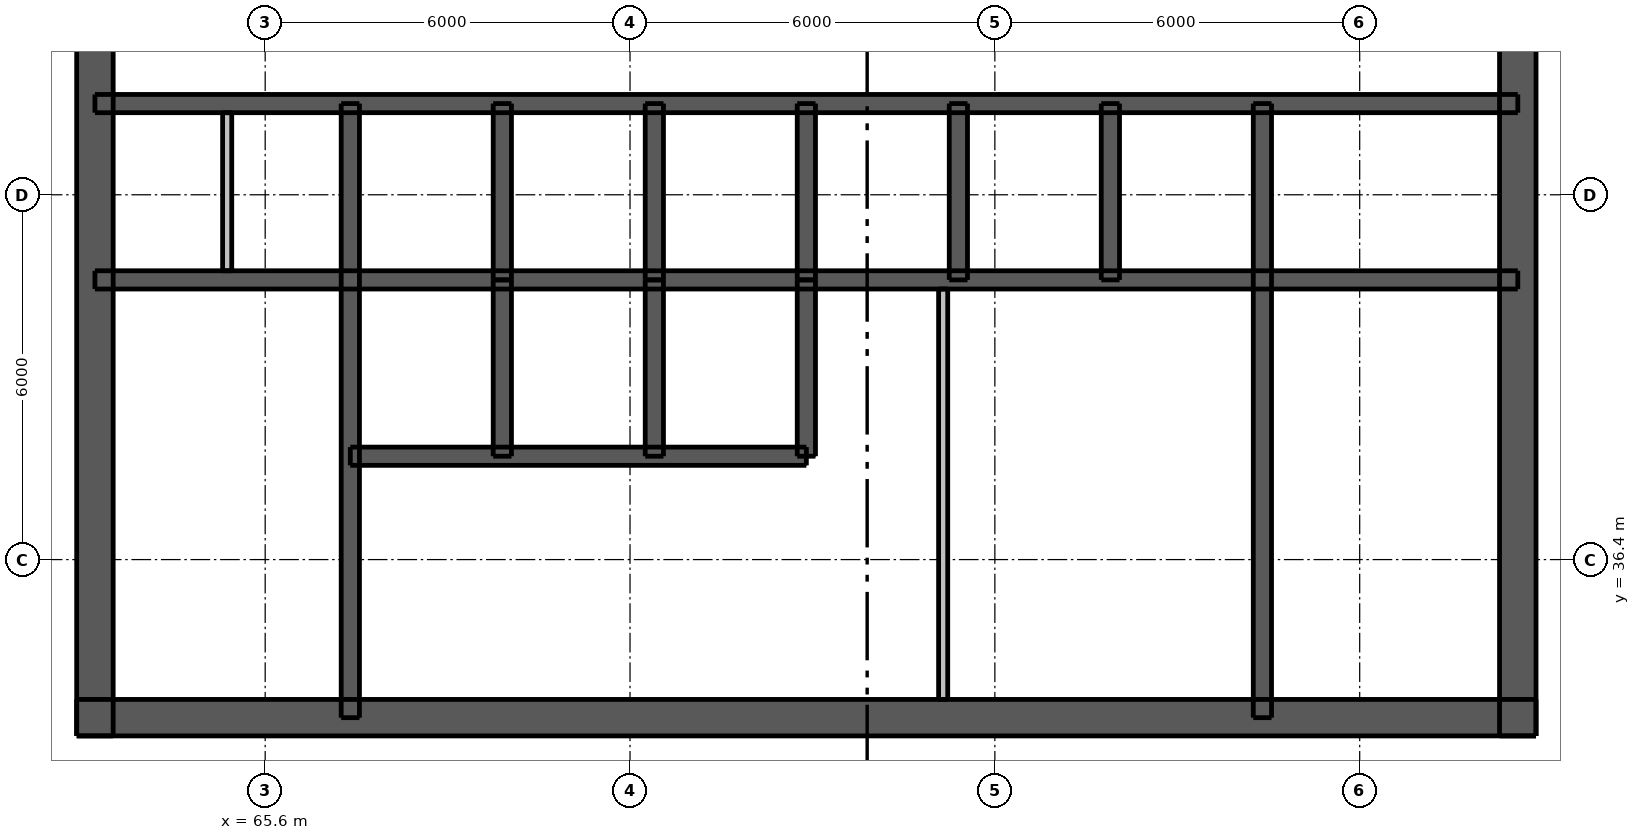
"""IFC4 building model, lengths in metres.
Left out: names, types, materials, properties, quantities, classifications, styles, units other than length and angle.
Written with IfcOpenShell. Run it as: python <this file> out.ifc"""

import sys

from ifc_helpers import new_model, si_unit, direction, frame, frame_2d, origin, place, context, subcontext, project, spatial, rectangle, extrude, element, fill, save


model = new_model("IFC4")
c1 = context("Model", 3, precision=1e-05, world=origin(), true_north=direction((0.0, 1.0)))
c2 = subcontext(c1, "Body", "Model", "MODEL_VIEW")
j1 = project(units=[si_unit("LENGTHUNIT", "METRE"), si_unit("PLANEANGLEUNIT", "RADIAN")], contexts=[c1])
p1 = place(None, origin())
s1 = spatial("IfcSite", under=j1, at=p1, CompositionType="ELEMENT")
p2 = place(p1, origin())
s2 = spatial("IfcBuilding", under=s1, at=p2, CompositionType="ELEMENT")
p3 = place(p2, frame((0.0, 0.0, 210.1)))
s3 = spatial("IfcBuildingStorey", under=s2, at=p3, CompositionType="ELEMENT", Elevation=210.1)
p4 = place(p3, frame((62.5, 33.8, 0.0), z_axis=(0.0, 0.0, 1.0), x_axis=(1.0, 0.0, 0.0)))
e1 = element("IfcWall", 1, at=p4, inside=s3, PredefinedType="SHEAR", context=c2, shape_type="SweptSolid", body=[
    extrude(rectangle(XDim=24.0, YDim=0.6, at=frame_2d((12.0, 0.0))), origin(), (0.0, 0.0, 1.0), 3.05),
])
p5 = place(p4, frame((1.925, 0.0, 0.0)))
e2 = element("IfcOpeningElement", 2, at=p5, cuts=e1, PredefinedType="OPENING", context=c2, shape_type="SweptSolid", body=[
    extrude(rectangle(XDim=1.1, YDim=2.1, at=frame_2d((0.55, 1.05))), frame((0.0, 0.31, 0.0), z_axis=(0.0, -1.0, 0.0), x_axis=(1.0, 0.0, 0.0)), (0.0, 0.0, 1.0), 0.62),
])
p6 = place(p4, frame((20.975, 0.0, 0.0)))
e3 = element("IfcOpeningElement", 3, at=p6, cuts=e1, PredefinedType="OPENING", context=c2, shape_type="SweptSolid", body=[
    extrude(rectangle(XDim=1.1, YDim=2.1, at=frame_2d((0.55, 1.05))), frame((0.0, 0.31, 0.0), z_axis=(0.0, -1.0, 0.0), x_axis=(1.0, 0.0, 0.0)), (0.0, 0.0, 1.0), 0.62),
])
p7 = place(p4, frame((8.0, 0.0, 0.0)))
e4 = element("IfcOpeningElement", 4, at=p7, cuts=e1, PredefinedType="OPENING", context=c2, shape_type="SweptSolid", body=[
    extrude(rectangle(XDim=1.1, YDim=2.1, at=frame_2d((0.55, 1.05))), frame((0.0, 0.31, 0.0), z_axis=(0.0, -1.0, 0.0), x_axis=(1.0, 0.0, 0.0)), (0.0, 0.0, 1.0), 0.62),
])
p8 = place(p4, frame((16.387, 0.0, 0.0)))
e5 = element("IfcOpeningElement", 5, at=p8, cuts=e1, PredefinedType="OPENING", context=c2, shape_type="SweptSolid", body=[
    extrude(rectangle(XDim=0.9, YDim=2.1, at=frame_2d((0.45, 1.05))), frame((0.0, 0.31, 0.0), z_axis=(0.0, -1.0, 0.0), x_axis=(1.0, 0.0, 0.0)), (0.0, 0.0, 1.0), 0.62),
])
p9 = place(p3, frame((62.8, 33.5, 0.0), z_axis=(0.0, 0.0, 1.0), x_axis=(0.0, 1.0, 0.0)))
e6 = element("IfcWall", 6, at=p9, inside=s3, PredefinedType="SHEAR", context=c2, shape_type="SweptSolid", body=[
    extrude(rectangle(XDim=24.0, YDim=0.6, at=frame_2d((12.0, 0.0))), origin(), (0.0, 0.0, 1.0), 3.05),
])
p10 = place(p9, frame((11.2, 0.0, 0.0)))
e7 = element("IfcOpeningElement", 7, at=p10, cuts=e6, PredefinedType="OPENING", context=c2, shape_type="SweptSolid", body=[
    extrude(rectangle(XDim=1.6, YDim=2.1, at=frame_2d((0.8, 1.05))), frame((0.0, 0.31, 0.0), z_axis=(0.0, -1.0, 0.0), x_axis=(1.0, 0.0, 0.0)), (0.0, 0.0, 1.0), 0.62),
])
p11 = place(p3, frame((86.2, 33.5, 0.0), z_axis=(0.0, 0.0, 1.0), x_axis=(0.0, 1.0, 0.0)))
e8 = element("IfcWall", 8, at=p11, inside=s3, PredefinedType="SHEAR", context=c2, shape_type="SweptSolid", body=[
    extrude(rectangle(XDim=24.0, YDim=0.6, at=frame_2d((12.0, 0.0))), origin(), (0.0, 0.0, 1.0), 3.05),
])
p12 = place(p11, frame((11.2, 0.0, 0.0)))
e9 = element("IfcOpeningElement", 9, at=p12, cuts=e8, PredefinedType="OPENING", context=c2, shape_type="SweptSolid", body=[
    extrude(rectangle(XDim=1.6, YDim=2.1, at=frame_2d((0.8, 1.05))), frame((0.0, 0.31, 0.0), z_axis=(0.0, -1.0, 0.0), x_axis=(1.0, 0.0, 0.0)), (0.0, 0.0, 1.0), 0.62),
])
p13 = place(p3, frame((62.8, 41.0, 0.0), z_axis=(0.0, 0.0, 1.0), x_axis=(1.0, 0.0, 0.0)))
e10 = element("IfcWall", 10, at=p13, inside=s3, PredefinedType="SHEAR", context=c2, shape_type="SweptSolid", body=[
    extrude(rectangle(XDim=23.4, YDim=0.3, at=frame_2d((11.7, 0.0))), origin(), (0.0, 0.0, 1.0), 3.05),
])
p14 = place(p3, frame((62.8, 43.9, 0.0), z_axis=(0.0, 0.0, 1.0), x_axis=(1.0, 0.0, 0.0)))
e11 = element("IfcWall", 11, at=p14, inside=s3, PredefinedType="SHEAR", context=c2, shape_type="SweptSolid", body=[
    extrude(rectangle(XDim=23.4, YDim=0.3, at=frame_2d((11.7, 0.0))), origin(), (0.0, 0.0, 1.0), 3.05),
])
p15 = place(p14, frame((0.788, 0.0, 0.0)))
e12 = element("IfcOpeningElement", 12, at=p15, cuts=e11, PredefinedType="OPENING", context=c2, shape_type="SweptSolid", body=[
    extrude(rectangle(XDim=0.9, YDim=2.1, at=frame_2d((0.45, 1.05))), frame((0.0, 0.16, 0.0), z_axis=(0.0, -1.0, 0.0), x_axis=(1.0, 0.0, 0.0)), (0.0, 0.0, 1.0), 0.32),
])
p16 = place(p14, frame((2.663, 0.0, 0.0)))
e13 = element("IfcOpeningElement", 13, at=p16, cuts=e11, PredefinedType="OPENING", context=c2, shape_type="SweptSolid", body=[
    extrude(rectangle(XDim=0.9, YDim=2.1, at=frame_2d((0.45, 1.05))), frame((0.0, 0.16, 0.0), z_axis=(0.0, -1.0, 0.0), x_axis=(1.0, 0.0, 0.0)), (0.0, 0.0, 1.0), 0.32),
])
p17 = place(p14, frame((20.775, 0.0, 0.0)))
e14 = element("IfcOpeningElement", 14, at=p17, cuts=e11, PredefinedType="OPENING", context=c2, shape_type="SweptSolid", body=[
    extrude(rectangle(XDim=0.9, YDim=2.1, at=frame_2d((0.45, 1.05))), frame((0.0, 0.16, 0.0), z_axis=(0.0, -1.0, 0.0), x_axis=(1.0, 0.0, 0.0)), (0.0, 0.0, 1.0), 0.32),
])
p18 = place(p14, frame((5.0, 0.0, 0.0)))
e15 = element("IfcOpeningElement", 15, at=p18, cuts=e11, PredefinedType="OPENING", context=c2, shape_type="SweptSolid", body=[
    extrude(rectangle(XDim=0.9, YDim=2.1, at=frame_2d((0.45, 1.05))), frame((0.0, 0.16, 0.0), z_axis=(0.0, -1.0, 0.0), x_axis=(1.0, 0.0, 0.0)), (0.0, 0.0, 1.0), 0.32),
])
p19 = place(p14, frame((10.0, 0.0, 0.0)))
e16 = element("IfcOpeningElement", 16, at=p19, cuts=e11, PredefinedType="OPENING", context=c2, shape_type="SweptSolid", body=[
    extrude(rectangle(XDim=0.9, YDim=2.1, at=frame_2d((0.45, 1.05))), frame((0.0, 0.16, 0.0), z_axis=(0.0, -1.0, 0.0), x_axis=(1.0, 0.0, 0.0)), (0.0, 0.0, 1.0), 0.32),
])
p20 = place(p14, frame((12.5, 0.0, 0.0)))
e17 = element("IfcOpeningElement", 17, at=p20, cuts=e11, PredefinedType="OPENING", context=c2, shape_type="SweptSolid", body=[
    extrude(rectangle(XDim=0.9, YDim=2.1, at=frame_2d((0.45, 1.05))), frame((0.0, 0.16, 0.0), z_axis=(0.0, -1.0, 0.0), x_axis=(1.0, 0.0, 0.0)), (0.0, 0.0, 1.0), 0.32),
])
p21 = place(p14, frame((17.5, 0.0, 0.0)))
e18 = element("IfcOpeningElement", 18, at=p21, cuts=e11, PredefinedType="OPENING", context=c2, shape_type="SweptSolid", body=[
    extrude(rectangle(XDim=0.9, YDim=2.1, at=frame_2d((0.45, 1.05))), frame((0.0, 0.16, 0.0), z_axis=(0.0, -1.0, 0.0), x_axis=(1.0, 0.0, 0.0)), (0.0, 0.0, 1.0), 0.32),
])
p22 = place(p3, frame((67.0, 33.8, 0.0), z_axis=(0.0, 0.0, 1.0), x_axis=(0.0, 1.0, 0.0)))
e19 = element("IfcWall", 19, at=p22, inside=s3, PredefinedType="SHEAR", context=c2, shape_type="SweptSolid", body=[
    extrude(rectangle(XDim=10.1, YDim=0.3, at=frame_2d((5.05, 0.0))), origin(), (0.0, 0.0, 1.0), 3.05),
])
p23 = place(p22, frame((0.5, 0.0, 0.0)))
e20 = element("IfcOpeningElement", 20, at=p23, cuts=e19, PredefinedType="OPENING", context=c2, shape_type="SweptSolid", body=[
    extrude(rectangle(XDim=1.1, YDim=2.1, at=frame_2d((0.55, 1.05))), frame((0.0, 0.16, 0.0), z_axis=(0.0, -1.0, 0.0), x_axis=(1.0, 0.0, 0.0)), (0.0, 0.0, 1.0), 0.32),
])
p24 = place(p3, frame((82.0, 33.8, 0.0), z_axis=(0.0, 0.0, 1.0), x_axis=(0.0, 1.0, 0.0)))
e21 = element("IfcWall", 21, at=p24, inside=s3, PredefinedType="SHEAR", context=c2, shape_type="SweptSolid", body=[
    extrude(rectangle(XDim=10.1, YDim=0.3, at=frame_2d((5.05, 0.0))), origin(), (0.0, 0.0, 1.0), 3.05),
])
for number, where, z_axis, x_axis in (
    (22, (69.5, 41.0, 0.0), (0.0, 0.0, 1.0), (0.0, 1.0, 0.0)),
    (23, (72.0, 41.0, 0.0), (0.0, 0.0, 1.0), (0.0, 1.0, 0.0)),
    (24, (74.5, 41.0, 0.0), (0.0, 0.0, 1.0), (0.0, 1.0, 0.0)),
    (25, (77.0, 41.0, 0.0), (0.0, 0.0, 1.0), (0.0, 1.0, 0.0)),
    (26, (79.5, 41.0, 0.0), (0.0, 0.0, 1.0), (0.0, 1.0, 0.0)),
):
    element("IfcWall", number, at=place(p3, frame(where, z_axis=z_axis, x_axis=x_axis)), inside=s3, PredefinedType="SHEAR", context=c2, shape_type="SweptSolid", body=[
        extrude(rectangle(XDim=2.9, YDim=0.3, at=frame_2d((1.45, 0.0))), origin(), (0.0, 0.0, 1.0), 3.05),
    ])
p25 = place(p3, frame((67.0, 38.1, 0.0), z_axis=(0.0, 0.0, 1.0), x_axis=(1.0, 0.0, 0.0)))
e27 = element("IfcWall", 27, at=p25, inside=s3, PredefinedType="SHEAR", context=c2, shape_type="SweptSolid", body=[
    extrude(rectangle(XDim=7.5, YDim=0.3, at=frame_2d((3.75, 0.0))), origin(), (0.0, 0.0, 1.0), 3.05),
])
p26 = place(p25, frame((0.7, 0.0, 0.0)))
e28 = element("IfcOpeningElement", 28, at=p26, cuts=e27, PredefinedType="OPENING", context=c2, shape_type="SweptSolid", body=[
    extrude(rectangle(XDim=1.1, YDim=2.1, at=frame_2d((0.55, 1.05))), frame((0.0, 0.16, 0.0), z_axis=(0.0, -1.0, 0.0), x_axis=(1.0, 0.0, 0.0)), (0.0, 0.0, 1.0), 0.32),
])
p27 = place(p25, frame((3.2, 0.0, 0.0)))
e29 = element("IfcOpeningElement", 29, at=p27, cuts=e27, PredefinedType="OPENING", context=c2, shape_type="SweptSolid", body=[
    extrude(rectangle(XDim=1.1, YDim=2.1, at=frame_2d((0.55, 1.05))), frame((0.0, 0.16, 0.0), z_axis=(0.0, -1.0, 0.0), x_axis=(1.0, 0.0, 0.0)), (0.0, 0.0, 1.0), 0.32),
])
p28 = place(p25, frame((5.65, 0.0, 0.0)))
e30 = element("IfcOpeningElement", 30, at=p28, cuts=e27, PredefinedType="OPENING", context=c2, shape_type="SweptSolid", body=[
    extrude(rectangle(XDim=1.2, YDim=2.1, at=frame_2d((0.6, 1.05))), frame((0.0, 0.16, 0.0), z_axis=(0.0, -1.0, 0.0), x_axis=(1.0, 0.0, 0.0)), (0.0, 0.0, 1.0), 0.32),
])
for number, where, z_axis, x_axis in (
    (31, (69.5, 38.1, 0.0), (0.0, 0.0, 1.0), (0.0, 1.0, 0.0)),
    (32, (72.0, 38.1, 0.0), (0.0, 0.0, 1.0), (0.0, 1.0, 0.0)),
    (33, (74.5, 38.1, 0.0), (0.0, 0.0, 1.0), (0.0, 1.0, 0.0)),
):
    element("IfcWall", number, at=place(p3, frame(where, z_axis=z_axis, x_axis=x_axis)), inside=s3, PredefinedType="SHEAR", context=c2, shape_type="SweptSolid", body=[
        extrude(rectangle(XDim=2.9, YDim=0.3, at=frame_2d((1.45, 0.0))), origin(), (0.0, 0.0, 1.0), 3.05),
    ])
p29 = place(p3, frame((76.75, 34.1, 0.0), z_axis=(0.0, 0.0, 1.0), x_axis=(0.0, 1.0, 0.0)))
e34 = element("IfcWall", 34, at=p29, inside=s3, PredefinedType="PLUMBINGWALL", context=c2, shape_type="SweptSolid", body=[
    extrude(rectangle(XDim=6.75, YDim=0.15, at=frame_2d((3.375, 0.0))), origin(), (0.0, 0.0, 1.0), 3.05),
])
p30 = place(p3, frame((64.975, 41.15, 0.0), z_axis=(0.0, 0.0, 1.0), x_axis=(0.0, 1.0, 0.0)))
e35 = element("IfcWall", 35, at=p30, inside=s3, PredefinedType="PLUMBINGWALL", context=c2, shape_type="SweptSolid", body=[
    extrude(rectangle(XDim=2.6, YDim=0.15, at=frame_2d((1.3, 0.0))), origin(), (0.0, 0.0, 1.0), 3.05),
])
p31 = place(p5, origin())
e36 = element("IfcDoor", 36, at=p31, inside=s3, OperationType="SINGLE_SWING_LEFT", PredefinedType="DOOR", context=c2, shape_type="SweptSolid", body=[
    extrude(rectangle(XDim=1.1, YDim=2.1, at=frame_2d((0.55, 1.05))), frame((0.0, 0.288, 0.0), z_axis=(0.0, -1.0, 0.0), x_axis=(1.0, 0.0, 0.0)), (0.0, 0.0, 1.0), 0.05),
])
fill(e2, e36)
p32 = place(p6, origin())
e37 = element("IfcDoor", 37, at=p32, inside=s3, OperationType="SINGLE_SWING_RIGHT", PredefinedType="DOOR", context=c2, shape_type="SweptSolid", body=[
    extrude(rectangle(XDim=1.1, YDim=2.1, at=frame_2d((0.55, 1.05))), frame((0.0, 0.288, 0.0), z_axis=(0.0, -1.0, 0.0), x_axis=(1.0, 0.0, 0.0)), (0.0, 0.0, 1.0), 0.05),
])
fill(e3, e37)
p33 = place(p10, origin())
e38 = element("IfcDoor", 38, at=p33, inside=s3, OperationType="DOUBLE_DOOR_SINGLE_SWING", PredefinedType="DOOR", context=c2, shape_type="SweptSolid", body=[
    extrude(rectangle(XDim=1.6, YDim=2.1, at=frame_2d((0.8, 1.05))), frame((0.0, -0.237, 0.0), z_axis=(0.0, -1.0, 0.0), x_axis=(1.0, 0.0, 0.0)), (0.0, 0.0, 1.0), 0.05),
])
fill(e7, e38)
p34 = place(p12, origin())
e39 = element("IfcDoor", 39, at=p34, inside=s3, OperationType="DOUBLE_DOOR_SINGLE_SWING", PredefinedType="DOOR", context=c2, shape_type="SweptSolid", body=[
    extrude(rectangle(XDim=1.6, YDim=2.1, at=frame_2d((0.8, 1.05))), frame((0.0, 0.288, 0.0), z_axis=(0.0, -1.0, 0.0), x_axis=(1.0, 0.0, 0.0)), (0.0, 0.0, 1.0), 0.05),
])
fill(e9, e39)
p35 = place(p7, origin())
e40 = element("IfcDoor", 40, at=p35, inside=s3, OperationType="SINGLE_SWING_LEFT", PredefinedType="DOOR", context=c2, shape_type="SweptSolid", body=[
    extrude(rectangle(XDim=1.1, YDim=2.1, at=frame_2d((0.55, 1.05))), frame((0.0, 0.288, 0.0), z_axis=(0.0, -1.0, 0.0), x_axis=(1.0, 0.0, 0.0)), (0.0, 0.0, 1.0), 0.05),
])
fill(e4, e40)
p36 = place(p23, origin())
e41 = element("IfcDoor", 41, at=p36, inside=s3, OperationType="SINGLE_SWING_RIGHT", PredefinedType="DOOR", context=c2, shape_type="SweptSolid", body=[
    extrude(rectangle(XDim=1.1, YDim=2.1, at=frame_2d((0.55, 1.05))), frame((0.0, -0.087, 0.0), z_axis=(0.0, -1.0, 0.0), x_axis=(1.0, 0.0, 0.0)), (0.0, 0.0, 1.0), 0.05),
])
fill(e20, e41)
p37 = place(p8, origin())
e42 = element("IfcDoor", 42, at=p37, inside=s3, OperationType="SINGLE_SWING_LEFT", PredefinedType="DOOR", context=c2, shape_type="SweptSolid", body=[
    extrude(rectangle(XDim=0.9, YDim=2.1, at=frame_2d((0.45, 1.05))), frame((0.0, 0.288, 0.0), z_axis=(0.0, -1.0, 0.0), x_axis=(1.0, 0.0, 0.0)), (0.0, 0.0, 1.0), 0.05),
])
fill(e5, e42)
p38 = place(p15, origin())
e43 = element("IfcDoor", 43, at=p38, inside=s3, OperationType="SINGLE_SWING_LEFT", PredefinedType="DOOR", context=c2, shape_type="SweptSolid", body=[
    extrude(rectangle(XDim=0.9, YDim=2.1, at=frame_2d((0.45, 1.05))), frame((0.0, -0.087, 0.0), z_axis=(0.0, -1.0, 0.0), x_axis=(1.0, 0.0, 0.0)), (0.0, 0.0, 1.0), 0.05),
])
fill(e12, e43)
p39 = place(p16, origin())
e44 = element("IfcDoor", 44, at=p39, inside=s3, OperationType="SINGLE_SWING_RIGHT", PredefinedType="DOOR", context=c2, shape_type="SweptSolid", body=[
    extrude(rectangle(XDim=0.9, YDim=2.1, at=frame_2d((0.45, 1.05))), frame((0.0, -0.087, 0.0), z_axis=(0.0, -1.0, 0.0), x_axis=(1.0, 0.0, 0.0)), (0.0, 0.0, 1.0), 0.05),
])
fill(e13, e44)
p40 = place(p17, origin())
e45 = element("IfcDoor", 45, at=p40, inside=s3, OperationType="SINGLE_SWING_LEFT", PredefinedType="DOOR", context=c2, shape_type="SweptSolid", body=[
    extrude(rectangle(XDim=0.9, YDim=2.1, at=frame_2d((0.45, 1.05))), frame((0.0, -0.087, 0.0), z_axis=(0.0, -1.0, 0.0), x_axis=(1.0, 0.0, 0.0)), (0.0, 0.0, 1.0), 0.05),
])
fill(e14, e45)
p41 = place(p18, origin())
e46 = element("IfcDoor", 46, at=p41, inside=s3, OperationType="SINGLE_SWING_RIGHT", PredefinedType="DOOR", context=c2, shape_type="SweptSolid", body=[
    extrude(rectangle(XDim=0.9, YDim=2.1, at=frame_2d((0.45, 1.05))), frame((0.0, -0.087, 0.0), z_axis=(0.0, -1.0, 0.0), x_axis=(1.0, 0.0, 0.0)), (0.0, 0.0, 1.0), 0.05),
])
fill(e15, e46)
p42 = place(p19, origin())
e47 = element("IfcDoor", 47, at=p42, inside=s3, OperationType="SINGLE_SWING_RIGHT", PredefinedType="DOOR", context=c2, shape_type="SweptSolid", body=[
    extrude(rectangle(XDim=0.9, YDim=2.1, at=frame_2d((0.45, 1.05))), frame((0.0, -0.087, 0.0), z_axis=(0.0, -1.0, 0.0), x_axis=(1.0, 0.0, 0.0)), (0.0, 0.0, 1.0), 0.05),
])
fill(e16, e47)
p43 = place(p20, origin())
e48 = element("IfcDoor", 48, at=p43, inside=s3, OperationType="SINGLE_SWING_LEFT", PredefinedType="DOOR", context=c2, shape_type="SweptSolid", body=[
    extrude(rectangle(XDim=0.9, YDim=2.1, at=frame_2d((0.45, 1.05))), frame((0.0, -0.087, 0.0), z_axis=(0.0, -1.0, 0.0), x_axis=(1.0, 0.0, 0.0)), (0.0, 0.0, 1.0), 0.05),
])
fill(e17, e48)
p44 = place(p21, origin())
e49 = element("IfcDoor", 49, at=p44, inside=s3, OperationType="SINGLE_SWING_LEFT", PredefinedType="DOOR", context=c2, shape_type="SweptSolid", body=[
    extrude(rectangle(XDim=0.9, YDim=2.1, at=frame_2d((0.45, 1.05))), frame((0.0, -0.087, 0.0), z_axis=(0.0, -1.0, 0.0), x_axis=(1.0, 0.0, 0.0)), (0.0, 0.0, 1.0), 0.05),
])
fill(e18, e49)
p45 = place(p26, origin())
e50 = element("IfcDoor", 50, at=p45, inside=s3, OperationType="DOUBLE_DOOR_SLIDING", PredefinedType="DOOR", context=c2, shape_type="SweptSolid", body=[
    extrude(rectangle(XDim=1.1, YDim=2.1, at=frame_2d((0.55, 1.05))), frame((0.0, 0.025, 0.0), z_axis=(0.0, -1.0, 0.0), x_axis=(1.0, 0.0, 0.0)), (0.0, 0.0, 1.0), 0.05),
])
fill(e28, e50)
p46 = place(p27, origin())
e51 = element("IfcDoor", 51, at=p46, inside=s3, OperationType="DOUBLE_DOOR_SLIDING", PredefinedType="DOOR", context=c2, shape_type="SweptSolid", body=[
    extrude(rectangle(XDim=1.1, YDim=2.1, at=frame_2d((0.55, 1.05))), frame((0.0, 0.025, 0.0), z_axis=(0.0, -1.0, 0.0), x_axis=(1.0, 0.0, 0.0)), (0.0, 0.0, 1.0), 0.05),
])
fill(e29, e51)
p47 = place(p28, origin())
e52 = element("IfcDoor", 52, at=p47, inside=s3, OperationType="DOUBLE_DOOR_SLIDING", PredefinedType="DOOR", context=c2, shape_type="SweptSolid", body=[
    extrude(rectangle(XDim=1.2, YDim=2.1, at=frame_2d((0.6, 1.05))), frame((0.0, 0.025, 0.0), z_axis=(0.0, -1.0, 0.0), x_axis=(1.0, 0.0, 0.0)), (0.0, 0.0, 1.0), 0.05),
])
fill(e30, e52)
save(model, sys.argv[1])
